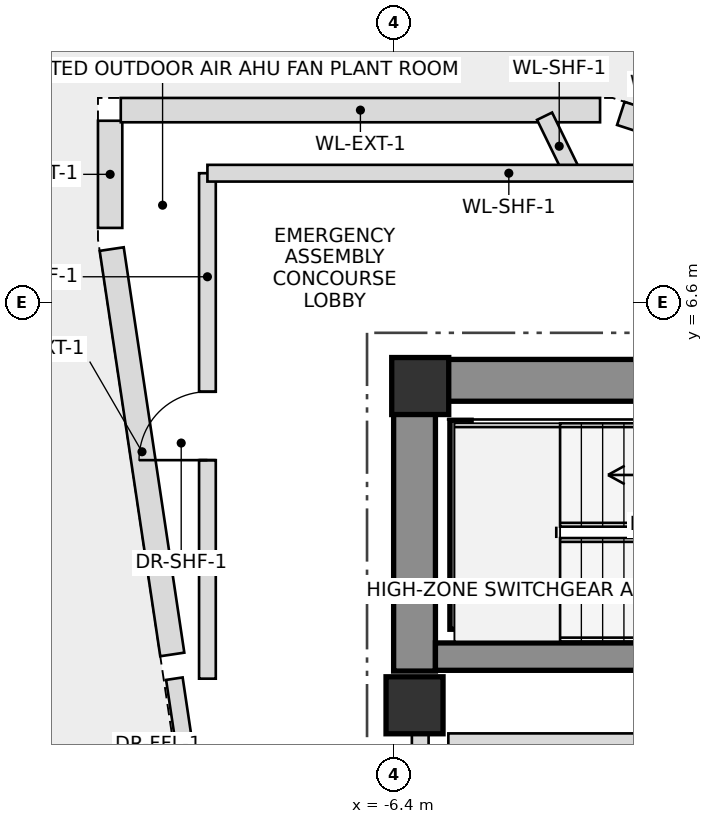
"""IFC4 building model, lengths in metres.
Left out: names, types, materials, properties, quantities, classifications, styles, units other than length and angle.
Written with IfcOpenShell. Run it as: python <this file> out.ifc"""

import sys

from ifc_helpers import new_model, si_unit, direction, frame, frame_2d, origin, origin_2d, place, context, subcontext, project, spatial, rectangle, extrude, source, transform, mapped, element, fill, save


model = new_model("IFC4")
c1 = context("Model", 3, precision=1e-05, world=origin(), true_north=direction((0.0, 1.0)))
c2 = subcontext(c1, "Body", "Model", "MODEL_VIEW")
j1 = project(units=[si_unit("LENGTHUNIT", "METRE"), si_unit("PLANEANGLEUNIT", "RADIAN")], contexts=[c1])
p1 = place(None, origin())
s1 = spatial("IfcSite", under=j1, at=p1, CompositionType="ELEMENT")
p2 = place(p1, origin())
s2 = spatial("IfcBuilding", under=s1, at=p2, CompositionType="ELEMENT")
p3 = place(p2, frame((0.0, 0.0, 284.75)))
s3 = spatial("IfcBuildingStorey", under=s2, at=p3, CompositionType="ELEMENT", Elevation=284.75)
m1 = source(origin(), c2, "Body", "SweptSolid", [
    extrude(rectangle(XDim=0.75, YDim=0.75, at=origin_2d()), origin(), (0.0, 0.0, 1.0), 5.1),
])
p4 = place(p3, frame((-6.05, 5.5, 0.0), z_axis=(0.0, 0.0, 1.0), x_axis=(1.0, 0.0, 0.0)))
e1 = element("IfcColumn", 1, at=p4, inside=s3, PredefinedType="COLUMN", context=c2, shape_type="MappedRepresentation", body=[
    mapped(m1, transform((0.0, 0.0, 0.0), scale=1.0)),
])
p5 = place(p3, frame((-6.4, 5.575, 0.0), z_axis=(0.0, 0.0, 1.0), x_axis=(1.0, 0.0, 0.0)))
e2 = element("IfcWall", 2, at=p5, inside=s3, PredefinedType="SHEAR", context=c2, shape_type="SweptSolid", body=[
    extrude(rectangle(XDim=12.8, YDim=0.55, at=frame_2d((6.4, 0.0))), origin(), (0.0, 0.0, 1.0), 5.1),
])
p6 = place(p5, frame((8.6, 0.0, 0.0)))
e3 = element("IfcOpeningElement", 3, at=p6, cuts=e2, PredefinedType="OPENING", context=c2, shape_type="SweptSolid", body=[
    extrude(rectangle(XDim=1.2, YDim=2.2, at=frame_2d((0.6, 1.1))), frame((0.0, 0.285, 0.0), z_axis=(0.0, -1.0, 0.0), x_axis=(1.0, 0.0, 0.0)), (0.0, 0.0, 1.0), 0.57),
])
p7 = place(p3, frame((-6.125, 1.75, 0.0), z_axis=(0.0, 0.0, 1.0), x_axis=(0.0, 1.0, 0.0)))
e4 = element("IfcWall", 4, at=p7, inside=s3, PredefinedType="SHEAR", context=c2, shape_type="SweptSolid", body=[
    extrude(rectangle(XDim=3.55, YDim=0.55, at=frame_2d((1.775, 0.0))), origin(), (0.0, 0.0, 1.0), 5.1),
])
p8 = place(p3, frame((-5.85, 1.94, 0.0), z_axis=(0.0, 0.0, 1.0), x_axis=(1.0, 0.0, 0.0)))
e5 = element("IfcWall", 5, at=p8, inside=s3, PredefinedType="SHEAR", context=c2, shape_type="SweptSolid", body=[
    extrude(rectangle(XDim=11.7, YDim=0.36, at=frame_2d((5.85, 0.0))), origin(), (0.0, 0.0, 1.0), 5.1),
])
p9 = place(p3, frame((-5.52, 2.3, 0.0), z_axis=(0.0, 0.0, 1.0), x_axis=(0.0, 1.0, 0.0)))
e6 = element("IfcWall", 6, at=p9, inside=s3, PredefinedType="SHEAR", context=c2, shape_type="SweptSolid", body=[
    extrude(rectangle(XDim=2.75, YDim=0.28, at=frame_2d((1.375, 0.0))), origin(), (0.0, 0.0, 1.0), 5.1),
])
p10 = place(p3, frame((-6.125, 1.3, 0.0), z_axis=(0.0, 0.0, 1.0), x_axis=(1.0, 0.0, 0.0)))
e7 = element("IfcColumn", 7, at=p10, inside=s3, PredefinedType="COLUMN", context=c2, shape_type="MappedRepresentation", body=[
    mapped(m1, transform((0.0, 0.0, 0.0), scale=1.0)),
])
p11 = place(p3, frame((-6.05, -0.95, 0.0), z_axis=(0.0, 0.0, 1.0), x_axis=(0.0, 1.0, 0.0)))
e8 = element("IfcWall", 8, at=p11, inside=s3, PredefinedType="PLUMBINGWALL", context=c2, shape_type="SweptSolid", body=[
    extrude(rectangle(XDim=1.9, YDim=0.22, at=frame_2d((0.95, 0.0))), origin(), (0.0, 0.0, 1.0), 3.88),
])
p12 = place(p11, frame((0.35, 0.0, 0.0)))
e9 = element("IfcOpeningElement", 9, at=p12, cuts=e8, PredefinedType="OPENING", context=c2, shape_type="SweptSolid", body=[
    extrude(rectangle(XDim=1.2, YDim=2.2, at=frame_2d((0.6, 1.1))), frame((0.0, 0.12, 0.0), z_axis=(0.0, -1.0, 0.0), x_axis=(1.0, 0.0, 0.0)), (0.0, 0.0, 1.0), 0.24),
])
p13 = place(p3, frame((-5.68, 0.84, 0.0), z_axis=(0.0, 0.0, 1.0), x_axis=(1.0, 0.0, 0.0)))
e10 = element("IfcWall", 10, at=p13, inside=s3, PredefinedType="PLUMBINGWALL", context=c2, shape_type="SweptSolid", body=[
    extrude(rectangle(XDim=11.33, YDim=0.18, at=frame_2d((5.665, 0.0))), origin(), (0.0, 0.0, 1.0), 4.9),
])
p14 = place(p13, frame((3.13, 0.0, 0.0)))
e11 = element("IfcOpeningElement", 11, at=p14, cuts=e10, PredefinedType="OPENING", context=c2, shape_type="SweptSolid", body=[
    extrude(rectangle(XDim=0.9, YDim=2.05, at=frame_2d((0.45, 1.025))), frame((0.0, 0.1, 0.0), z_axis=(0.0, -1.0, 0.0), x_axis=(1.0, 0.0, 0.0)), (0.0, 0.0, 1.0), 0.2),
])
p15 = place(p13, frame((10.25, 0.0, 0.0)))
e12 = element("IfcOpeningElement", 12, at=p15, cuts=e10, PredefinedType="OPENING", context=c2, shape_type="SweptSolid", body=[
    extrude(rectangle(XDim=0.9, YDim=2.05, at=frame_2d((0.45, 1.025))), frame((0.0, 0.1, 0.0), z_axis=(0.0, -1.0, 0.0), x_axis=(1.0, 0.0, 0.0)), (0.0, 0.0, 1.0), 0.2),
])
p16 = place(p3, frame((-9.312, 1.969, 0.0), z_axis=(0.0, 0.0, 1.0), x_axis=(-0.147820166873, 0.989014255846, 0.0)))
e13 = element("IfcWall", 13, at=p16, inside=s3, PredefinedType="SOLIDWALL", context=c2, shape_type="SweptSolid", body=[
    extrude(rectangle(XDim=5.393, YDim=0.32, at=frame_2d((2.696, 0.0))), origin(), (0.0, 0.0, 1.0), 3.555),
])
p17 = place(p3, frame((-10.13, 7.58, 0.0), z_axis=(0.0, 0.0, 1.0), x_axis=(0.0, 1.0, 0.0)))
e14 = element("IfcWall", 14, at=p17, inside=s3, PredefinedType="SOLIDWALL", context=c2, shape_type="SweptSolid", body=[
    extrude(rectangle(XDim=1.41, YDim=0.32, at=frame_2d((0.705, 0.0))), origin(), (0.0, 0.0, 1.0), 4.9),
])
p18 = place(p3, frame((-9.99, 9.13, 0.0), z_axis=(0.0, 0.0, 1.0), x_axis=(1.0, 0.0, 0.0)))
e15 = element("IfcWall", 15, at=p18, inside=s3, PredefinedType="SOLIDWALL", context=c2, shape_type="SweptSolid", body=[
    extrude(rectangle(XDim=6.306, YDim=0.32, at=frame_2d((3.153, 0.0))), origin(), (0.0, 0.0, 1.0), 4.9),
])
p19 = place(p3, frame((-3.411, 9.087, 0.0), z_axis=(0.0, 0.0, 1.0), x_axis=(0.951279079294, -0.308331174709, 0.0)))
e16 = element("IfcWall", 16, at=p19, inside=s3, PredefinedType="SOLIDWALL", context=c2, shape_type="SweptSolid", body=[
    extrude(rectangle(XDim=1.514, YDim=0.32, at=frame_2d((0.757, 0.0))), origin(), (0.0, 0.0, 1.0), 4.9),
])
p20 = place(p3, frame((-4.029, 8.26, 0.0), z_axis=(0.0, 0.0, 1.0), x_axis=(-0.438303234839, 0.898827165994, 0.0)))
e17 = element("IfcWall", 17, at=p20, inside=s3, PredefinedType="PLUMBINGWALL", context=c2, shape_type="SweptSolid", body=[
    extrude(rectangle(XDim=0.879, YDim=0.22, at=frame_2d((0.439, 0.0))), origin(), (0.0, 0.0, 1.0), 4.9),
])
p21 = place(p3, frame((-7.798, -8.3, 0.0), z_axis=(0.0, 0.0, 1.0), x_axis=(-0.147812364981, 0.989015421901, 0.0)))
e18 = element("IfcWall", 18, at=p21, inside=s3, PredefinedType="PLUMBINGWALL", context=c2, shape_type="SweptSolid", body=[
    extrude(rectangle(XDim=10.061, YDim=0.22, at=frame_2d((5.03, 0.0))), origin(), (0.0, 0.0, 1.0), 3.555),
])
p22 = place(p21, frame((7.783, 0.0, 0.0)))
e19 = element("IfcOpeningElement", 19, at=p22, cuts=e18, PredefinedType="OPENING", context=c2, shape_type="SweptSolid", body=[
    extrude(rectangle(XDim=1.2, YDim=2.2, at=frame_2d((0.6, 1.1))), frame((0.0, 0.12, 0.0), z_axis=(0.0, -1.0, 0.0), x_axis=(1.0, 0.0, 0.0)), (0.0, 0.0, 1.0), 0.24),
])
p23 = place(p3, frame((-8.85, 1.65, 0.0), z_axis=(0.0, 0.0, 1.0), x_axis=(0.0, 1.0, 0.0)))
e20 = element("IfcWall", 20, at=p23, inside=s3, PredefinedType="PLUMBINGWALL", context=c2, shape_type="SweptSolid", body=[
    extrude(rectangle(XDim=6.65, YDim=0.22, at=frame_2d((3.325, 0.0))), origin(), (0.0, 0.0, 1.0), 3.555),
])
p24 = place(p23, frame((2.875, 0.0, 0.0)))
e21 = element("IfcOpeningElement", 21, at=p24, cuts=e20, PredefinedType="OPENING", context=c2, shape_type="SweptSolid", body=[
    extrude(rectangle(XDim=0.9, YDim=2.05, at=frame_2d((0.45, 1.025))), frame((0.0, 0.12, 0.0), z_axis=(0.0, -1.0, 0.0), x_axis=(1.0, 0.0, 0.0)), (0.0, 0.0, 1.0), 0.24),
])
p25 = place(p3, frame((-8.85, 8.3, 0.0), z_axis=(0.0, 0.0, 1.0), x_axis=(1.0, 0.0, 0.0)))
e22 = element("IfcWall", 22, at=p25, inside=s3, PredefinedType="PLUMBINGWALL", context=c2, shape_type="SweptSolid", body=[
    extrude(rectangle(XDim=7.931, YDim=0.22, at=frame_2d((3.966, 0.0))), origin(), (0.0, 0.0, 1.0), 4.9),
])
p26 = place(p24, origin())
e23 = element("IfcDoor", 23, at=p26, inside=s3, OperationType="SINGLE_SWING_LEFT", PredefinedType="DOOR", context=c2, shape_type="SweptSolid", body=[
    extrude(rectangle(XDim=0.9, YDim=2.05, at=frame_2d((0.45, 1.025))), frame((0.0, 0.025, 0.0), z_axis=(0.0, -1.0, 0.0), x_axis=(1.0, 0.0, 0.0)), (0.0, 0.0, 1.0), 0.05),
])
fill(e21, e23)
save(model, sys.argv[1])
